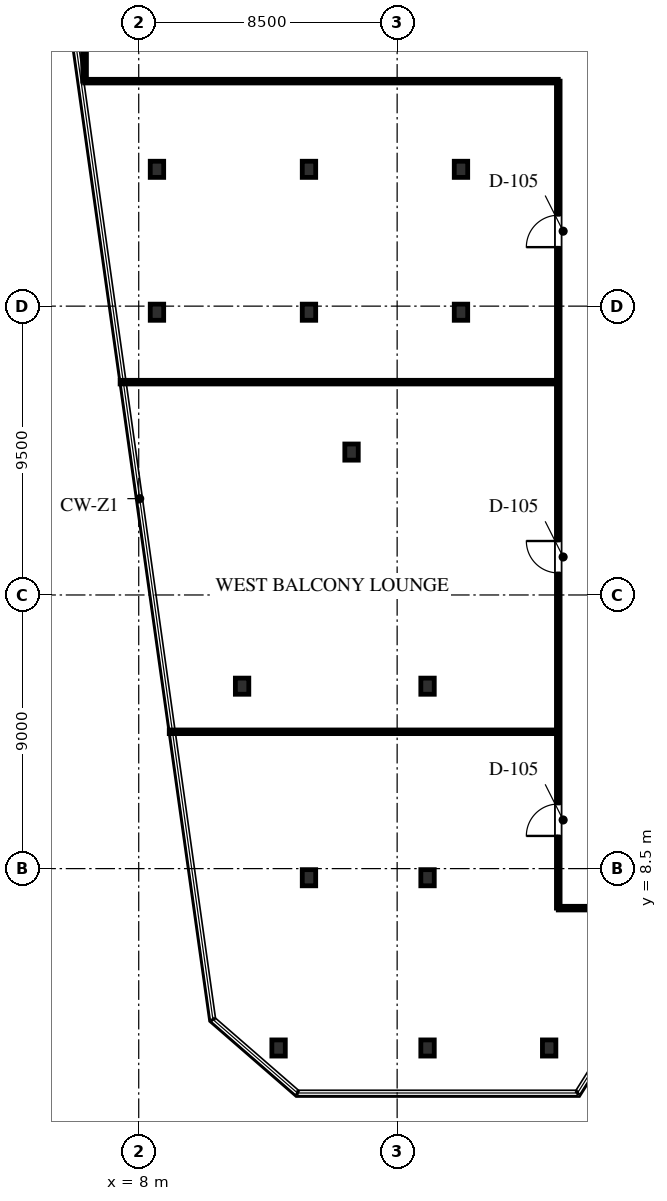
"""IFC4 building model, lengths in metres.
Left out: names, types, materials, properties, quantities, classifications, styles, units other than length and angle.
Written with IfcOpenShell. Run it as: python <this file> out.ifc"""

import sys

from ifc_helpers import new_model, si_unit, direction, frame, frame_2d, origin, origin_2d, place, context, subcontext, project, spatial, rectangle, i_section, extrude, element, fill, save


model = new_model("IFC4")
c1 = context("Model", 3, precision=1e-05, world=origin(), true_north=direction((0.0, 1.0)))
c2 = subcontext(c1, "Body", "Model", "MODEL_VIEW")
j1 = project(units=[si_unit("LENGTHUNIT", "METRE"), si_unit("PLANEANGLEUNIT", "RADIAN")], contexts=[c1])
p1 = place(None, origin())
s1 = spatial("IfcSite", under=j1, at=p1, CompositionType="ELEMENT")
p2 = place(p1, origin())
s2 = spatial("IfcBuilding", under=s1, at=p2, CompositionType="ELEMENT")
p3 = place(p2, frame((0.0, 0.0, 37.5)))
s3 = spatial("IfcBuildingStorey", under=s2, at=p3, CompositionType="ELEMENT", Elevation=37.5)
for number, where, z_axis, x_axis in (
    (1, (12.6, 2.6, 0.0), (0.0, 0.0, 1.0), (1.0, 0.0, 0.0)),
    (2, (15.0, 22.2, 0.0), (0.0, 0.0, 1.0), (1.0, 0.0, 0.0)),
    (3, (8.6, 26.8, 0.0), (0.0, 0.0, 1.0), (1.0, 0.0, 0.0)),
    (4, (13.6, 26.8, 0.0), (0.0, 0.0, 1.0), (1.0, 0.0, 0.0)),
    (5, (18.6, 26.8, 0.0), (0.0, 0.0, 1.0), (1.0, 0.0, 0.0)),
    (6, (8.6, 31.5, 0.0), (0.0, 0.0, 1.0), (1.0, 0.0, 0.0)),
    (7, (13.6, 31.5, 0.0), (0.0, 0.0, 1.0), (1.0, 0.0, 0.0)),
    (8, (17.5, 2.6, 0.0), (0.0, 0.0, 1.0), (1.0, 0.0, 0.0)),
    (9, (18.6, 31.5, 0.0), (0.0, 0.0, 1.0), (1.0, 0.0, 0.0)),
    (10, (21.5, 2.6, 0.0), (0.0, 0.0, 1.0), (1.0, 0.0, 0.0)),
    (11, (13.6, 8.2, 0.0), (0.0, 0.0, 1.0), (1.0, 0.0, 0.0)),
    (12, (17.5, 8.2, 0.0), (0.0, 0.0, 1.0), (1.0, 0.0, 0.0)),
    (13, (11.4, 14.5, 0.0), (0.0, 0.0, 1.0), (1.0, 0.0, 0.0)),
    (14, (17.5, 14.5, 0.0), (0.0, 0.0, 1.0), (1.0, 0.0, 0.0)),
):
    element("IfcColumn", number, at=place(p3, frame(where, z_axis=z_axis, x_axis=x_axis)), inside=s3, PredefinedType="COLUMN", context=c2, shape_type="SweptSolid", body=[
        extrude(i_section(OverallWidth=0.442, OverallDepth=0.531, WebThickness=0.066, FlangeThickness=0.106, FilletRadius=0.03, at=origin_2d()), origin(), (0.0, 0.0, 1.0), 4.0),
    ])
p4 = place(p3, frame((6.22, 34.4, 0.0), z_axis=(0.0, 0.0, 1.0), x_axis=(1.0, 0.0, 0.0)))
e15 = element("IfcWall", 15, at=p4, inside=s3, PredefinedType="PARTITIONING", context=c2, shape_type="SweptSolid", body=[
    extrude(rectangle(XDim=15.58, YDim=0.12, at=frame_2d((7.79, 0.0))), origin(), (0.0, 0.0, 1.0), 2.813),
])
p5 = place(p3, frame((6.22, 34.4, 0.0), z_axis=(0.0, 0.0, 1.0), x_axis=(0.0, 1.0, 0.0)))
e16 = element("IfcWall", 16, at=p5, inside=s3, PredefinedType="PARTITIONING", context=c2, shape_type="SweptSolid", body=[
    extrude(rectangle(XDim=3.65, YDim=0.12, at=frame_2d((1.825, 0.0))), origin(), (0.0, 0.0, 1.0), 3.74),
])
p6 = place(p3, frame((21.8, 7.2, 0.0), z_axis=(0.0, 0.0, 1.0), x_axis=(0.0, 1.0, 0.0)))
e17 = element("IfcWall", 17, at=p6, inside=s3, PredefinedType="PARTITIONING", context=c2, shape_type="SweptSolid", body=[
    extrude(rectangle(XDim=27.2, YDim=0.12, at=frame_2d((13.6, 0.0))), origin(), (0.0, 0.0, 1.0), 2.813),
])
p7 = place(p6, frame((2.375, 0.0, 0.0)))
e18 = element("IfcOpeningElement", 18, at=p7, cuts=e17, PredefinedType="OPENING", context=c2, shape_type="SweptSolid", body=[
    extrude(rectangle(XDim=1.05, YDim=2.2, at=frame_2d((0.525, 1.1))), frame((0.0, 0.07, 0.0), z_axis=(0.0, -1.0, 0.0), x_axis=(1.0, 0.0, 0.0)), (0.0, 0.0, 1.0), 0.14),
])
p8 = place(p6, frame((11.025, 0.0, 0.0)))
e19 = element("IfcOpeningElement", 19, at=p8, cuts=e17, PredefinedType="OPENING", context=c2, shape_type="SweptSolid", body=[
    extrude(rectangle(XDim=1.05, YDim=2.2, at=frame_2d((0.525, 1.1))), frame((0.0, 0.07, 0.0), z_axis=(0.0, -1.0, 0.0), x_axis=(1.0, 0.0, 0.0)), (0.0, 0.0, 1.0), 0.14),
])
p9 = place(p6, frame((21.74, 0.0, 0.0)))
e20 = element("IfcOpeningElement", 20, at=p9, cuts=e17, PredefinedType="OPENING", context=c2, shape_type="SweptSolid", body=[
    extrude(rectangle(XDim=1.05, YDim=2.2, at=frame_2d((0.525, 1.1))), frame((0.0, 0.07, 0.0), z_axis=(0.0, -1.0, 0.0), x_axis=(1.0, 0.0, 0.0)), (0.0, 0.0, 1.0), 0.14),
])
p10 = place(p3, frame((21.8, 7.2, 0.0), z_axis=(0.0, 0.0, 1.0), x_axis=(1.0, 0.0, 0.0)))
e21 = element("IfcWall", 21, at=p10, inside=s3, PredefinedType="PARTITIONING", context=c2, shape_type="SweptSolid", body=[
    extrude(rectangle(XDim=2.0, YDim=0.12, at=frame_2d((1.0, 0.0))), origin(), (0.0, 0.0, 1.0), 2.978),
])
p11 = place(p3, frame((9.004, 13.0, 0.0), z_axis=(0.0, 0.0, 1.0), x_axis=(1.0, 0.0, 0.0)))
e22 = element("IfcWall", 22, at=p11, inside=s3, PredefinedType="PARTITIONING", context=c2, shape_type="SweptSolid", body=[
    extrude(rectangle(XDim=12.728, YDim=0.12, at=frame_2d((6.364, 0.0))), origin(), (0.0, 0.0, 1.0), 2.813),
])
p12 = place(p3, frame((7.388, 24.5, 0.0), z_axis=(0.0, 0.0, 1.0), x_axis=(1.0, 0.0, 0.0)))
e23 = element("IfcWall", 23, at=p12, inside=s3, PredefinedType="PARTITIONING", context=c2, shape_type="SweptSolid", body=[
    extrude(rectangle(XDim=14.344, YDim=0.12, at=frame_2d((7.172, 0.0))), origin(), (0.0, 0.0, 1.0), 2.978),
])
p13 = place(p7, origin())
e24 = element("IfcDoor", 24, at=p13, inside=s3, OperationType="SINGLE_SWING_LEFT", PredefinedType="DOOR", context=c2, shape_type="SweptSolid", body=[
    extrude(rectangle(XDim=1.05, YDim=2.2, at=frame_2d((0.525, 1.1))), frame((0.0, 0.025, 0.0), z_axis=(0.0, -1.0, 0.0), x_axis=(1.0, 0.0, 0.0)), (0.0, 0.0, 1.0), 0.05),
])
fill(e18, e24)
p14 = place(p8, origin())
e25 = element("IfcDoor", 25, at=p14, inside=s3, OperationType="SINGLE_SWING_RIGHT", PredefinedType="DOOR", context=c2, shape_type="SweptSolid", body=[
    extrude(rectangle(XDim=1.05, YDim=2.2, at=frame_2d((0.525, 1.1))), frame((0.0, 0.025, 0.0), z_axis=(0.0, -1.0, 0.0), x_axis=(1.0, 0.0, 0.0)), (0.0, 0.0, 1.0), 0.05),
])
fill(e19, e25)
p15 = place(p9, origin())
e26 = element("IfcDoor", 26, at=p15, inside=s3, OperationType="SINGLE_SWING_LEFT", PredefinedType="DOOR", context=c2, shape_type="SweptSolid", body=[
    extrude(rectangle(XDim=1.05, YDim=2.2, at=frame_2d((0.525, 1.1))), frame((0.0, 0.025, 0.0), z_axis=(0.0, -1.0, 0.0), x_axis=(1.0, 0.0, 0.0)), (0.0, 0.0, 1.0), 0.05),
])
fill(e20, e26)
save(model, sys.argv[1])
